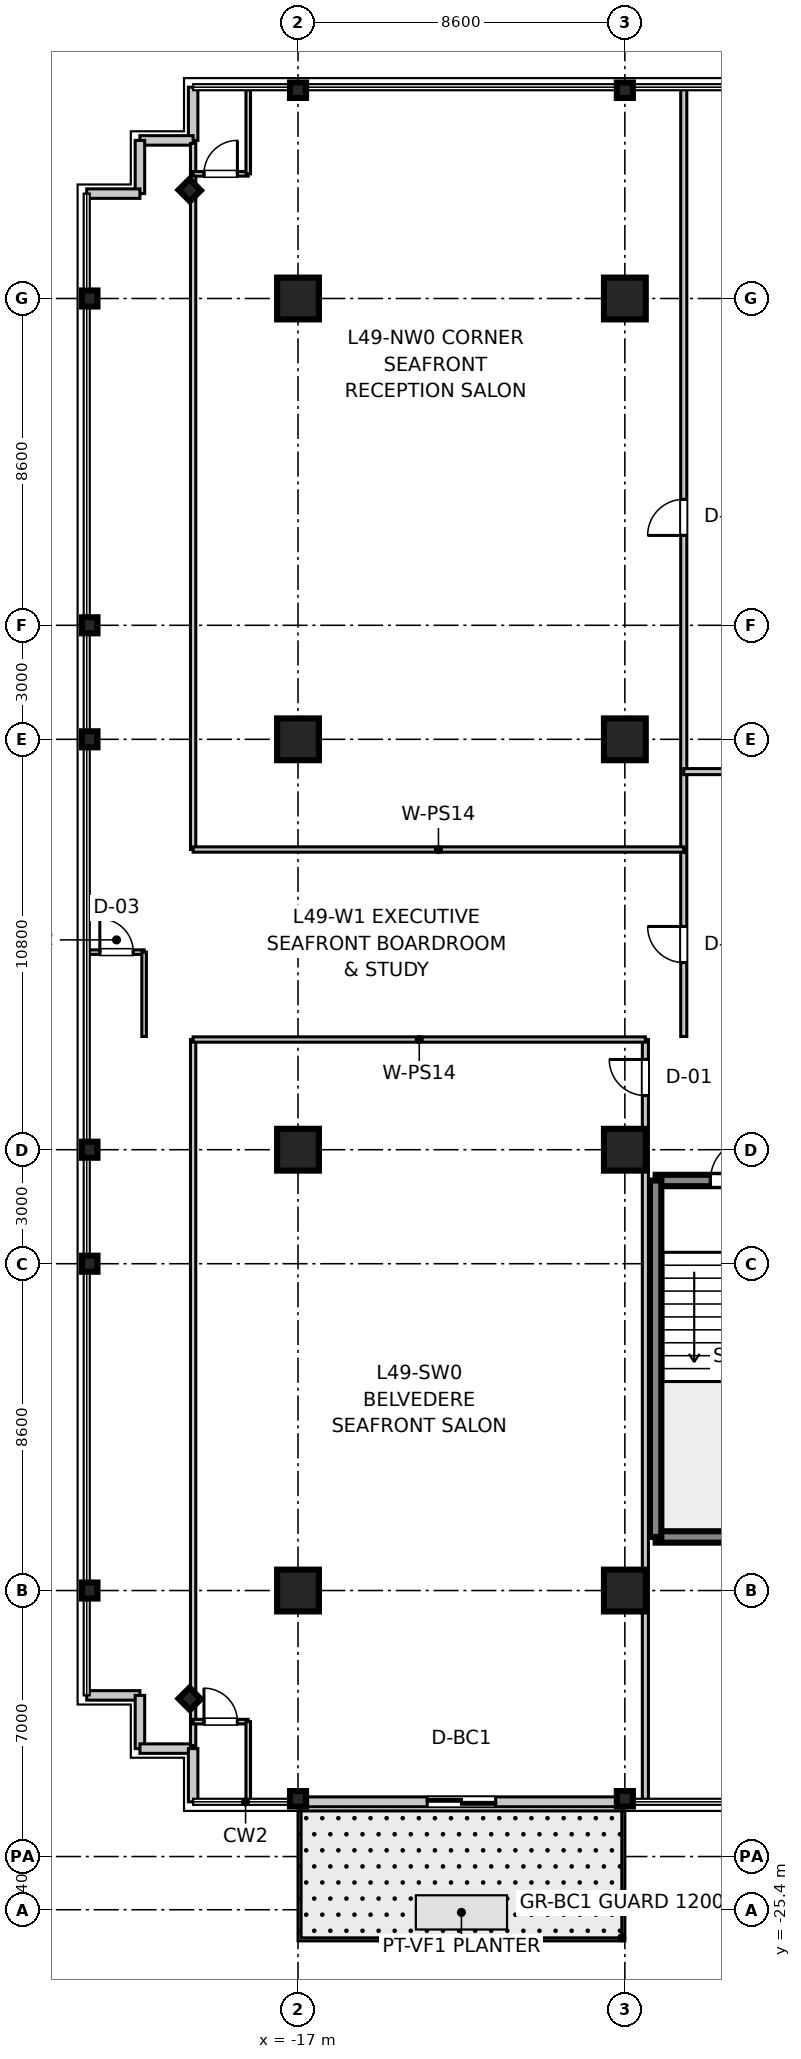
"""IFC4 building model, lengths in metres.
Left out: names, types, materials, properties, quantities, classifications, styles, units other than length and angle.
Written with IfcOpenShell. Run it as: python <this file> out.ifc"""

import sys

from ifc_helpers import new_model, si_unit, direction, frame, frame_2d, origin, origin_2d, place, context, subcontext, project, spatial, rectangle, i_section, extrude, source, transform, mapped, element, fill, save


model = new_model("IFC4")
c1 = context("Model", 3, precision=1e-05, world=origin(), true_north=direction((0.0, 1.0)))
c2 = subcontext(c1, "Body", "Model", "MODEL_VIEW")
j1 = project(units=[si_unit("LENGTHUNIT", "METRE"), si_unit("PLANEANGLEUNIT", "RADIAN")], contexts=[c1])
p1 = place(None, origin())
s1 = spatial("IfcSite", under=j1, at=p1, CompositionType="ELEMENT")
p2 = place(p1, origin())
s2 = spatial("IfcBuilding", under=s1, at=p2, CompositionType="ELEMENT")
p3 = place(p2, frame((0.0, 0.0, 192.8)))
s3 = spatial("IfcBuildingStorey", under=s2, at=p3, CompositionType="ELEMENT", Elevation=192.8)
m1 = source(origin(), c2, "Body", "SweptSolid", [
    extrude(rectangle(XDim=1.1, YDim=1.1, at=origin_2d()), origin(), (0.0, 0.0, 1.0), 3.605),
])
for number, where, z_axis, x_axis in (
    (1, (-17.0, -17.0, 0.0), (0.0, 0.0, 1.0), (1.0, 0.0, 0.0)),
    (2, (-17.0, -5.4, 0.0), (0.0, 0.0, 1.0), (1.0, 0.0, 0.0)),
    (3, (-17.0, 5.4, 0.0), (0.0, 0.0, 1.0), (1.0, 0.0, 0.0)),
    (4, (-17.0, 17.0, 0.0), (0.0, 0.0, 1.0), (1.0, 0.0, 0.0)),
    (5, (-8.4, -17.0, 0.0), (0.0, 0.0, 1.0), (1.0, 0.0, 0.0)),
    (6, (-8.4, -5.4, 0.0), (0.0, 0.0, 1.0), (1.0, 0.0, 0.0)),
    (7, (-8.4, 5.4, 0.0), (0.0, 0.0, 1.0), (1.0, 0.0, 0.0)),
    (8, (-8.4, 17.0, 0.0), (0.0, 0.0, 1.0), (1.0, 0.0, 0.0)),
):
    element("IfcColumn", number, at=place(p3, frame(where, z_axis=z_axis, x_axis=x_axis)), inside=s3, PredefinedType="COLUMN", context=c2, shape_type="MappedRepresentation", body=[
        mapped(m1, transform((0.0, 0.0, 0.0), scale=1.0)),
    ])
m2 = source(origin(), c2, "Body", "SweptSolid", [
    extrude(i_section(OverallWidth=0.406, OverallDepth=0.422, WebThickness=0.019, FlangeThickness=0.03, at=origin_2d()), origin(), (0.0, 0.0, 1.0), 3.605),
])
for number, where, z_axis, x_axis in (
    (9, (-22.48, -17.0, 0.0), (0.0, 0.0, 1.0), (1.0, 0.0, 0.0)),
    (10, (-22.48, -8.4, 0.0), (0.0, 0.0, 1.0), (1.0, 0.0, 0.0)),
    (11, (-22.48, -5.4, 0.0), (0.0, 0.0, 1.0), (1.0, 0.0, 0.0)),
    (12, (-22.48, 5.4, 0.0), (0.0, 0.0, 1.0), (1.0, 0.0, 0.0)),
    (13, (-22.48, 8.4, 0.0), (0.0, 0.0, 1.0), (1.0, 0.0, 0.0)),
    (14, (-22.48, 17.0, 0.0), (0.0, 0.0, 1.0), (1.0, 0.0, 0.0)),
    (15, (-17.0, -22.48, 0.0), (0.0, 0.0, 1.0), (0.0, 1.0, 0.0)),
    (16, (-17.0, 22.48, 0.0), (0.0, 0.0, 1.0), (0.0, 1.0, 0.0)),
    (17, (-8.4, -22.48, 0.0), (0.0, 0.0, 1.0), (0.0, 1.0, 0.0)),
    (18, (-8.4, 22.48, 0.0), (0.0, 0.0, 1.0), (0.0, 1.0, 0.0)),
    (19, (-19.85, -19.85, 0.0), (0.0, 0.0, 1.0), (0.707, 0.707, 0.0)),
    (20, (-19.85, 19.85, 0.0), (0.0, 0.0, 1.0), (0.707, 0.707, 0.0)),
):
    element("IfcColumn", number, at=place(p3, frame(where, z_axis=z_axis, x_axis=x_axis)), inside=s3, PredefinedType="COLUMN", context=c2, shape_type="MappedRepresentation", body=[
        mapped(m2, transform((0.0, 0.0, 0.0), scale=1.0)),
    ])
m3 = source(origin(), c2, "Body", "SweptSolid", [
    extrude(rectangle(XDim=3.98, YDim=0.3, at=frame_2d((1.99, 0.0))), origin(), (0.0, 0.0, 1.0), 3.39),
])
p4 = place(p3, frame((-7.59, -15.59, 0.0), z_axis=(0.0, 0.0, 1.0), x_axis=(1.0, 0.0, 0.0)))
e21 = element("IfcWall", 21, at=p4, inside=s3, PredefinedType="SHEAR", context=c2, shape_type="MappedRepresentation", body=[
    mapped(m3, transform((0.0, 0.0, 0.0), scale=1.0)),
])
p5 = place(p3, frame((-7.59, -6.21, 0.0), z_axis=(0.0, 0.0, 1.0), x_axis=(1.0, 0.0, 0.0)))
e22 = element("IfcWall", 22, at=p5, inside=s3, PredefinedType="SHEAR", context=c2, shape_type="MappedRepresentation", body=[
    mapped(m3, transform((0.0, 0.0, 0.0), scale=1.0)),
])
p6 = place(p5, frame((1.44, 0.0, 0.0)))
e23 = element("IfcOpeningElement", 23, at=p6, cuts=e22, PredefinedType="OPENING", context=c2, shape_type="SweptSolid", body=[
    extrude(rectangle(XDim=1.1, YDim=2.15, at=frame_2d((0.55, 1.075))), frame((0.0, 0.16, 0.0), z_axis=(0.0, -1.0, 0.0), x_axis=(1.0, 0.0, 0.0)), (0.0, 0.0, 1.0), 0.32),
])
m4 = source(origin(), c2, "Body", "SweptSolid", [
    extrude(rectangle(XDim=9.38, YDim=0.3, at=frame_2d((4.69, 0.0))), origin(), (0.0, 0.0, 1.0), 3.39),
])
p7 = place(p3, frame((-7.59, -15.59, 0.0), z_axis=(0.0, 0.0, 1.0), x_axis=(0.0, 1.0, 0.0)))
e24 = element("IfcWall", 24, at=p7, inside=s3, PredefinedType="SHEAR", context=c2, shape_type="MappedRepresentation", body=[
    mapped(m4, transform((0.0, 0.0, 0.0), scale=1.0)),
])
m5 = source(origin(), c2, "Body", "SweptSolid", [
    extrude(rectangle(XDim=1.4, YDim=0.25, at=frame_2d((0.7, 0.0))), origin(), (0.0, 0.0, 1.0), 3.39),
])
p8 = place(p3, frame((-19.76, 21.16, 0.0), z_axis=(0.0, 0.0, 1.0), x_axis=(0.0, 1.0, 0.0)))
e25 = element("IfcWall", 25, at=p8, inside=s3, PredefinedType="STANDARD", context=c2, shape_type="MappedRepresentation", body=[
    mapped(m5, transform((0.0, 0.0, 0.0), scale=1.0)),
])
m6 = source(origin(), c2, "Body", "SweptSolid", [
    extrude(rectangle(XDim=1.4, YDim=0.25, at=frame_2d((0.7, 0.0))), origin(), (0.0, 0.0, 1.0), 3.39),
])
for number, where, z_axis, x_axis in (
    (26, (-21.16, 21.16, 0.0), (0.0, 0.0, 1.0), (1.0, 0.0, 0.0)),
    (27, (-21.16, 19.76, 0.0), (0.0, 0.0, 1.0), (0.0, 1.0, 0.0)),
):
    element("IfcWall", number, at=place(p3, frame(where, z_axis=z_axis, x_axis=x_axis)), inside=s3, PredefinedType="STANDARD", context=c2, shape_type="MappedRepresentation", body=[
        mapped(m6, transform((0.0, 0.0, 0.0), scale=1.0)),
    ])
for number, where, z_axis, x_axis in (
    (28, (-22.56, 19.76, 0.0), (0.0, 0.0, 1.0), (1.0, 0.0, 0.0)),
    (29, (-22.56, -19.76, 0.0), (0.0, 0.0, 1.0), (1.0, 0.0, 0.0)),
):
    element("IfcWall", number, at=place(p3, frame(where, z_axis=z_axis, x_axis=x_axis)), inside=s3, PredefinedType="STANDARD", context=c2, shape_type="MappedRepresentation", body=[
        mapped(m5, transform((0.0, 0.0, 0.0), scale=1.0)),
    ])
for number, where, z_axis, x_axis in (
    (30, (-21.16, -21.16, 0.0), (0.0, 0.0, 1.0), (0.0, 1.0, 0.0)),
    (31, (-21.16, -21.16, 0.0), (0.0, 0.0, 1.0), (1.0, 0.0, 0.0)),
):
    element("IfcWall", number, at=place(p3, frame(where, z_axis=z_axis, x_axis=x_axis)), inside=s3, PredefinedType="STANDARD", context=c2, shape_type="MappedRepresentation", body=[
        mapped(m6, transform((0.0, 0.0, 0.0), scale=1.0)),
    ])
p9 = place(p3, frame((-19.76, -22.56, 0.0), z_axis=(0.0, 0.0, 1.0), x_axis=(0.0, 1.0, 0.0)))
e32 = element("IfcWall", 32, at=p9, inside=s3, PredefinedType="STANDARD", context=c2, shape_type="MappedRepresentation", body=[
    mapped(m5, transform((0.0, 0.0, 0.0), scale=1.0)),
])
m7 = source(origin(), c2, "Body", "SweptSolid", [
    extrude(rectangle(XDim=8.6, YDim=0.26, at=frame_2d((4.3, 0.0))), origin(), (0.0, 0.0, 1.0), 2.87),
])
p10 = place(p3, frame((-17.0, -22.56, 0.0), z_axis=(0.0, 0.0, 1.0), x_axis=(1.0, 0.0, 0.0)))
e33 = element("IfcWall", 33, at=p10, inside=s3, PredefinedType="STANDARD", context=c2, shape_type="MappedRepresentation", body=[
    mapped(m7, transform((0.0, 0.0, 0.0), scale=1.0)),
])
p11 = place(p10, frame((3.4, 0.0, 0.0)))
e34 = element("IfcOpeningElement", 34, at=p11, cuts=e33, PredefinedType="OPENING", context=c2, shape_type="SweptSolid", body=[
    extrude(rectangle(XDim=1.8, YDim=2.25, at=frame_2d((0.9, 1.125))), frame((0.0, 0.14, 0.0), z_axis=(0.0, -1.0, 0.0), x_axis=(1.0, 0.0, 0.0)), (0.0, 0.0, 1.0), 0.28),
])
m8 = source(origin(), c2, "Body", "SweptSolid", [
    extrude(rectangle(XDim=20.0, YDim=0.16, at=frame_2d((10.0, 0.0))), origin(), (0.0, 0.0, 1.0), 2.73),
])
p12 = place(p3, frame((-6.85, 2.5, 0.0), z_axis=(0.0, 0.0, 1.0), x_axis=(0.0, 1.0, 0.0)))
e35 = element("IfcWall", 35, at=p12, inside=s3, PredefinedType="PARTITIONING", context=c2, shape_type="MappedRepresentation", body=[
    mapped(m8, transform((0.0, 0.0, 0.0), scale=1.0)),
])
p13 = place(p12, frame((8.265, 0.0, 0.0)))
e36 = element("IfcOpeningElement", 36, at=p13, cuts=e35, PredefinedType="OPENING", context=c2, shape_type="SweptSolid", body=[
    extrude(rectangle(XDim=0.95, YDim=2.1, at=frame_2d((0.475, 1.05))), frame((0.0, 0.09, 0.0), z_axis=(0.0, -1.0, 0.0), x_axis=(1.0, 0.0, 0.0)), (0.0, 0.0, 1.0), 0.18),
])
m9 = source(origin(), c2, "Body", "SweptSolid", [
    extrude(rectangle(XDim=18.58, YDim=0.14, at=frame_2d((9.29, 0.0))), origin(), (0.0, 0.0, 1.0), 2.73),
])
p14 = place(p3, frame((-19.76, 2.5, 0.0), z_axis=(0.0, 0.0, 1.0), x_axis=(0.0, 1.0, 0.0)))
e37 = element("IfcWall", 37, at=p14, inside=s3, PredefinedType="PARTITIONING", context=c2, shape_type="MappedRepresentation", body=[
    mapped(m9, transform((0.0, 0.0, 0.0), scale=1.0)),
])
m10 = source(origin(), c2, "Body", "SweptSolid", [
    extrude(rectangle(XDim=12.91, YDim=0.14, at=frame_2d((6.455, 0.0))), origin(), (0.0, 0.0, 1.0), 2.73),
])
p15 = place(p3, frame((-19.76, 2.5, 0.0), z_axis=(0.0, 0.0, 1.0), x_axis=(1.0, 0.0, 0.0)))
e38 = element("IfcWall", 38, at=p15, inside=s3, PredefinedType="PARTITIONING", context=c2, shape_type="MappedRepresentation", body=[
    mapped(m10, transform((0.0, 0.0, 0.0), scale=1.0)),
])
m11 = source(origin(), c2, "Body", "SweptSolid", [
    extrude(rectangle(XDim=1.45, YDim=0.12, at=frame_2d((0.725, 0.0))), origin(), (0.0, 0.0, 1.0), 2.73),
])
p16 = place(p3, frame((-19.76, 20.28, 0.0), z_axis=(0.0, 0.0, 1.0), x_axis=(1.0, 0.0, 0.0)))
e39 = element("IfcWall", 39, at=p16, inside=s3, PredefinedType="PARTITIONING", context=c2, shape_type="MappedRepresentation", body=[
    mapped(m11, transform((0.0, 0.0, 0.0), scale=1.0)),
])
p17 = place(p16, frame((0.285, 0.0, 0.0)))
e40 = element("IfcOpeningElement", 40, at=p17, cuts=e39, PredefinedType="OPENING", context=c2, shape_type="SweptSolid", body=[
    extrude(rectangle(XDim=0.88, YDim=2.1, at=frame_2d((0.44, 1.05))), frame((0.0, 0.07, 0.0), z_axis=(0.0, -1.0, 0.0), x_axis=(1.0, 0.0, 0.0)), (0.0, 0.0, 1.0), 0.14),
])
m12 = source(origin(), c2, "Body", "SweptSolid", [
    extrude(rectangle(XDim=2.22, YDim=0.12, at=frame_2d((1.11, 0.0))), origin(), (0.0, 0.0, 1.0), 2.73),
])
p18 = place(p3, frame((-18.31, 20.28, 0.0), z_axis=(0.0, 0.0, 1.0), x_axis=(0.0, 1.0, 0.0)))
e41 = element("IfcWall", 41, at=p18, inside=s3, PredefinedType="PARTITIONING", context=c2, shape_type="MappedRepresentation", body=[
    mapped(m12, transform((0.0, 0.0, 0.0), scale=1.0)),
])
m13 = source(origin(), c2, "Body", "SweptSolid", [
    extrude(rectangle(XDim=10.19, YDim=0.16, at=frame_2d((5.095, 0.0))), origin(), (0.0, 0.0, 1.0), 2.73),
])
p19 = place(p3, frame((-6.85, 4.55, 0.0), z_axis=(0.0, 0.0, 1.0), x_axis=(1.0, 0.0, 0.0)))
e42 = element("IfcWall", 42, at=p19, inside=s3, PredefinedType="PARTITIONING", context=c2, shape_type="MappedRepresentation", body=[
    mapped(m13, transform((0.0, 0.0, 0.0), scale=1.0)),
])
p20 = place(p19, frame((6.178, 0.0, 0.0)))
e43 = element("IfcOpeningElement", 43, at=p20, cuts=e42, PredefinedType="OPENING", context=c2, shape_type="SweptSolid", body=[
    extrude(rectangle(XDim=1.5, YDim=2.15, at=frame_2d((0.75, 1.075))), frame((0.0, 0.09, 0.0), z_axis=(0.0, -1.0, 0.0), x_axis=(1.0, 0.0, 0.0)), (0.0, 0.0, 1.0), 0.18),
])
p21 = place(p3, frame((-7.86, -22.5, 0.0), z_axis=(0.0, 0.0, 1.0), x_axis=(0.0, 1.0, 0.0)))
e44 = element("IfcWall", 44, at=p21, inside=s3, PredefinedType="PARTITIONING", context=c2, shape_type="MappedRepresentation", body=[
    mapped(m8, transform((0.0, 0.0, 0.0), scale=1.0)),
])
p22 = place(p21, frame((18.525, 0.0, 0.0)))
e45 = element("IfcOpeningElement", 45, at=p22, cuts=e44, PredefinedType="OPENING", context=c2, shape_type="SweptSolid", body=[
    extrude(rectangle(XDim=0.95, YDim=2.1, at=frame_2d((0.475, 1.05))), frame((0.0, 0.09, 0.0), z_axis=(0.0, -1.0, 0.0), x_axis=(1.0, 0.0, 0.0)), (0.0, 0.0, 1.0), 0.18),
])
p23 = place(p3, frame((-19.76, -21.08, 0.0), z_axis=(0.0, 0.0, 1.0), x_axis=(0.0, 1.0, 0.0)))
e46 = element("IfcWall", 46, at=p23, inside=s3, PredefinedType="PARTITIONING", context=c2, shape_type="MappedRepresentation", body=[
    mapped(m9, transform((0.0, 0.0, 0.0), scale=1.0)),
])
m14 = source(origin(), c2, "Body", "SweptSolid", [
    extrude(rectangle(XDim=11.9, YDim=0.14, at=frame_2d((5.95, 0.0))), origin(), (0.0, 0.0, 1.0), 2.73),
])
p24 = place(p3, frame((-19.76, -2.5, 0.0), z_axis=(0.0, 0.0, 1.0), x_axis=(1.0, 0.0, 0.0)))
e47 = element("IfcWall", 47, at=p24, inside=s3, PredefinedType="PARTITIONING", context=c2, shape_type="MappedRepresentation", body=[
    mapped(m14, transform((0.0, 0.0, 0.0), scale=1.0)),
])
p25 = place(p3, frame((-19.76, -20.45, 0.0), z_axis=(0.0, 0.0, 1.0), x_axis=(1.0, 0.0, 0.0)))
e48 = element("IfcWall", 48, at=p25, inside=s3, PredefinedType="PARTITIONING", context=c2, shape_type="MappedRepresentation", body=[
    mapped(m11, transform((0.0, 0.0, 0.0), scale=1.0)),
])
p26 = place(p25, frame((0.285, 0.0, 0.0)))
e49 = element("IfcOpeningElement", 49, at=p26, cuts=e48, PredefinedType="OPENING", context=c2, shape_type="SweptSolid", body=[
    extrude(rectangle(XDim=0.88, YDim=2.1, at=frame_2d((0.44, 1.05))), frame((0.0, 0.07, 0.0), z_axis=(0.0, -1.0, 0.0), x_axis=(1.0, 0.0, 0.0)), (0.0, 0.0, 1.0), 0.14),
])
m15 = source(origin(), c2, "Body", "SweptSolid", [
    extrude(rectangle(XDim=2.05, YDim=0.12, at=frame_2d((1.025, 0.0))), origin(), (0.0, 0.0, 1.0), 2.73),
])
p27 = place(p3, frame((-18.31, -22.5, 0.0), z_axis=(0.0, 0.0, 1.0), x_axis=(0.0, 1.0, 0.0)))
e50 = element("IfcWall", 50, at=p27, inside=s3, PredefinedType="PARTITIONING", context=c2, shape_type="MappedRepresentation", body=[
    mapped(m15, transform((0.0, 0.0, 0.0), scale=1.0)),
])
m16 = source(origin(), c2, "Body", "SweptSolid", [
    extrude(rectangle(XDim=4.84, YDim=0.16, at=frame_2d((2.42, 0.0))), origin(), (0.0, 0.0, 1.0), 2.73),
])
p28 = place(p3, frame((-6.85, -2.42, 0.0), z_axis=(0.0, 0.0, 1.0), x_axis=(0.0, 1.0, 0.0)))
e51 = element("IfcWall", 51, at=p28, inside=s3, PredefinedType="PARTITIONING", context=c2, shape_type="MappedRepresentation", body=[
    mapped(m16, transform((0.0, 0.0, 0.0), scale=1.0)),
])
p29 = place(p28, frame((1.945, 0.0, 0.0)))
e52 = element("IfcOpeningElement", 52, at=p29, cuts=e51, PredefinedType="OPENING", context=c2, shape_type="SweptSolid", body=[
    extrude(rectangle(XDim=0.95, YDim=2.1, at=frame_2d((0.475, 1.05))), frame((0.0, 0.09, 0.0), z_axis=(0.0, -1.0, 0.0), x_axis=(1.0, 0.0, 0.0)), (0.0, 0.0, 1.0), 0.18),
])
p30 = place(p3, frame((-22.5, -0.2, 0.0), z_axis=(0.0, 0.0, 1.0), x_axis=(1.0, 0.0, 0.0)))
e53 = element("IfcWall", 53, at=p30, inside=s3, PredefinedType="PARTITIONING", context=c2, shape_type="MappedRepresentation", body=[
    mapped(m11, transform((0.0, 0.0, 0.0), scale=1.0)),
])
p31 = place(p30, frame((0.285, 0.0, 0.0)))
e54 = element("IfcOpeningElement", 54, at=p31, cuts=e53, PredefinedType="OPENING", context=c2, shape_type="SweptSolid", body=[
    extrude(rectangle(XDim=0.88, YDim=2.1, at=frame_2d((0.44, 1.05))), frame((0.0, 0.07, 0.0), z_axis=(0.0, -1.0, 0.0), x_axis=(1.0, 0.0, 0.0)), (0.0, 0.0, 1.0), 0.14),
])
p32 = place(p3, frame((-21.05, -2.42, 0.0), z_axis=(0.0, 0.0, 1.0), x_axis=(0.0, 1.0, 0.0)))
e55 = element("IfcWall", 55, at=p32, inside=s3, PredefinedType="PARTITIONING", context=c2, shape_type="MappedRepresentation", body=[
    mapped(m12, transform((0.0, 0.0, 0.0), scale=1.0)),
])
m17 = source(origin(), c2, "Body", "SweptSolid", [
    extrude(rectangle(XDim=1.1, YDim=2.15, at=frame_2d((0.55, 1.075))), frame((0.0, 0.025, 0.0), z_axis=(0.0, -1.0, 0.0), x_axis=(1.0, 0.0, 0.0)), (0.0, 0.0, 1.0), 0.05),
])
p33 = place(p6, frame((1.1, 0.0, 0.0), z_axis=(0.0, 0.0, 1.0), x_axis=(-1.0, 0.0, 0.0)))
e56 = element("IfcDoor", 56, at=p33, inside=s3, OperationType="SINGLE_SWING_RIGHT", PredefinedType="DOOR", context=c2, shape_type="MappedRepresentation", body=[
    mapped(m17, transform((0.0, 0.0, 0.0), scale=1.0)),
])
fill(e23, e56)
m18 = source(origin(), c2, "Body", "SweptSolid", [
    extrude(rectangle(XDim=0.88, YDim=2.1, at=frame_2d((0.44, 1.05))), frame((0.0, 0.025, 0.0), z_axis=(0.0, -1.0, 0.0), x_axis=(1.0, 0.0, 0.0)), (0.0, 0.0, 1.0), 0.05),
])
p34 = place(p17, origin())
e57 = element("IfcDoor", 57, at=p34, inside=s3, OperationType="SINGLE_SWING_RIGHT", PredefinedType="DOOR", context=c2, shape_type="MappedRepresentation", body=[
    mapped(m18, transform((0.0, 0.0, 0.0), scale=1.0)),
])
fill(e40, e57)
m19 = source(origin(), c2, "Body", "SweptSolid", [
    extrude(rectangle(XDim=0.95, YDim=2.1, at=frame_2d((0.475, 1.05))), frame((0.0, 0.025, 0.0), z_axis=(0.0, -1.0, 0.0), x_axis=(1.0, 0.0, 0.0)), (0.0, 0.0, 1.0), 0.05),
])
p35 = place(p13, origin())
e58 = element("IfcDoor", 58, at=p35, inside=s3, OperationType="SINGLE_SWING_LEFT", PredefinedType="DOOR", context=c2, shape_type="MappedRepresentation", body=[
    mapped(m19, transform((0.0, 0.0, 0.0), scale=1.0)),
])
fill(e36, e58)
p36 = place(p26, frame((0.88, 0.0, 0.0), z_axis=(0.0, 0.0, 1.0), x_axis=(-1.0, 0.0, 0.0)))
e59 = element("IfcDoor", 59, at=p36, inside=s3, OperationType="SINGLE_SWING_LEFT", PredefinedType="DOOR", context=c2, shape_type="MappedRepresentation", body=[
    mapped(m18, transform((0.0, 0.0, 0.0), scale=1.0)),
])
fill(e49, e59)
p37 = place(p22, origin())
e60 = element("IfcDoor", 60, at=p37, inside=s3, OperationType="SINGLE_SWING_RIGHT", PredefinedType="DOOR", context=c2, shape_type="MappedRepresentation", body=[
    mapped(m19, transform((0.0, 0.0, 0.0), scale=1.0)),
])
fill(e45, e60)
p38 = place(p31, frame((0.88, 0.0, 0.0), z_axis=(0.0, 0.0, 1.0), x_axis=(-1.0, 0.0, 0.0)))
e61 = element("IfcDoor", 61, at=p38, inside=s3, OperationType="SINGLE_SWING_LEFT", PredefinedType="DOOR", context=c2, shape_type="MappedRepresentation", body=[
    mapped(m18, transform((0.0, 0.0, 0.0), scale=1.0)),
])
fill(e54, e61)
p39 = place(p29, origin())
e62 = element("IfcDoor", 62, at=p39, inside=s3, OperationType="SINGLE_SWING_RIGHT", PredefinedType="DOOR", context=c2, shape_type="MappedRepresentation", body=[
    mapped(m19, transform((0.0, 0.0, 0.0), scale=1.0)),
])
fill(e52, e62)
m20 = source(origin(), c2, "Body", "SweptSolid", [
    extrude(rectangle(XDim=1.8, YDim=2.25, at=frame_2d((0.9, 1.125))), frame((0.0, 0.025, 0.0), z_axis=(0.0, -1.0, 0.0), x_axis=(1.0, 0.0, 0.0)), (0.0, 0.0, 1.0), 0.05),
])
p40 = place(p11, frame((1.8, 0.0, 0.0), z_axis=(0.0, 0.0, 1.0), x_axis=(-1.0, 0.0, 0.0)))
e63 = element("IfcDoor", 63, at=p40, inside=s3, OperationType="DOUBLE_DOOR_SLIDING", PredefinedType="DOOR", context=c2, shape_type="MappedRepresentation", body=[
    mapped(m20, transform((0.0, 0.0, 0.0), scale=1.0)),
])
fill(e34, e63)
save(model, sys.argv[1])
